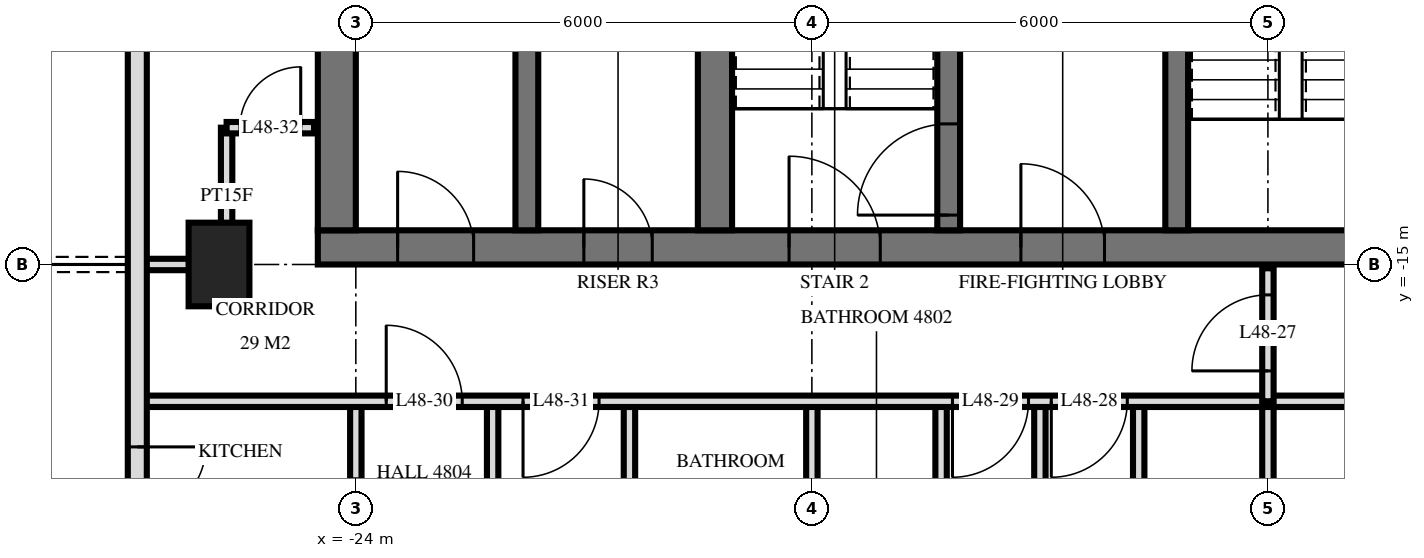
"""IFC4 building model, lengths in metres.
Left out: names, types, materials, properties, quantities, classifications, styles, units other than length and angle.
Written with IfcOpenShell. Run it as: python <this file> out.ifc"""

import sys

from ifc_helpers import new_model, si_unit, direction, frame, frame_2d, origin, origin_2d, place, context, subcontext, project, spatial, rectangle, extrude, element, fill, save


model = new_model("IFC4")
c1 = context("Model", 3, precision=1e-05, world=origin(), true_north=direction((0.0, 1.0)))
c2 = subcontext(c1, "Body", "Model", "MODEL_VIEW")
j1 = project(units=[si_unit("LENGTHUNIT", "METRE"), si_unit("PLANEANGLEUNIT", "RADIAN")], contexts=[c1])
p1 = place(None, origin())
s1 = spatial("IfcSite", under=j1, at=p1, CompositionType="ELEMENT")
p2 = place(p1, origin())
s2 = spatial("IfcBuilding", under=s1, at=p2, CompositionType="ELEMENT")
p3 = place(p2, frame((0.0, 0.0, 187.1)))
s3 = spatial("IfcBuildingStorey", under=s2, at=p3, CompositionType="ELEMENT", Elevation=187.1)
p4 = place(p3, frame((-25.8, -15.0, 0.0), z_axis=(0.0, 0.0, 1.0), x_axis=(0.0, 1.0, 0.0)))
e1 = element("IfcColumn", 1, at=p4, inside=s3, PredefinedType="COLUMN", context=c2, shape_type="SweptSolid", body=[
    extrude(rectangle(XDim=1.1, YDim=0.8, at=origin_2d()), origin(), (0.0, 0.0, 1.0), 3.5),
])
p5 = place(p3, frame((-24.5, -14.775, 0.0), z_axis=(0.0, 0.0, 1.0), x_axis=(1.0, 0.0, 0.0)))
e2 = element("IfcWall", 2, at=p5, inside=s3, PredefinedType="SHEAR", context=c2, shape_type="SweptSolid", body=[
    extrude(rectangle(XDim=14.5, YDim=0.45, at=frame_2d((7.25, 0.0))), origin(), (0.0, 0.0, 1.0), 3.5),
])
p6 = place(p5, frame((6.2, 0.0, 0.0)))
e3 = element("IfcOpeningElement", 3, at=p6, cuts=e2, PredefinedType="OPENING", context=c2, shape_type="SweptSolid", body=[
    extrude(rectangle(XDim=1.2, YDim=2.1, at=frame_2d((0.6, 1.05))), frame((0.0, 0.235, 0.0), z_axis=(0.0, -1.0, 0.0), x_axis=(1.0, 0.0, 0.0)), (0.0, 0.0, 1.0), 0.47),
])
p7 = place(p5, frame((9.25, 0.0, 0.0)))
e4 = element("IfcOpeningElement", 4, at=p7, cuts=e2, PredefinedType="OPENING", context=c2, shape_type="SweptSolid", body=[
    extrude(rectangle(XDim=1.1, YDim=2.1, at=frame_2d((0.55, 1.05))), frame((0.0, 0.235, 0.0), z_axis=(0.0, -1.0, 0.0), x_axis=(1.0, 0.0, 0.0)), (0.0, 0.0, 1.0), 0.47),
])
p8 = place(p5, frame((3.5, 0.0, 0.0)))
e5 = element("IfcOpeningElement", 5, at=p8, cuts=e2, PredefinedType="OPENING", context=c2, shape_type="SweptSolid", body=[
    extrude(rectangle(XDim=0.9, YDim=2.1, at=frame_2d((0.45, 1.05))), frame((0.0, 0.235, 0.0), z_axis=(0.0, -1.0, 0.0), x_axis=(1.0, 0.0, 0.0)), (0.0, 0.0, 1.0), 0.47),
])
p9 = place(p5, frame((1.05, 0.0, 0.0)))
e6 = element("IfcOpeningElement", 6, at=p9, cuts=e2, PredefinedType="OPENING", context=c2, shape_type="SweptSolid", body=[
    extrude(rectangle(XDim=1.0, YDim=2.1, at=frame_2d((0.5, 1.05))), frame((0.0, 0.235, 0.0), z_axis=(0.0, -1.0, 0.0), x_axis=(1.0, 0.0, 0.0)), (0.0, 0.0, 1.0), 0.47),
])
p10 = place(p3, frame((-24.25, -14.55, 0.0), z_axis=(0.0, 0.0, 1.0), x_axis=(0.0, 1.0, 0.0)))
e7 = element("IfcWall", 7, at=p10, inside=s3, PredefinedType="SHEAR", context=c2, shape_type="SweptSolid", body=[
    extrude(rectangle(XDim=14.1, YDim=0.5, at=frame_2d((7.05, 0.0))), origin(), (0.0, 0.0, 1.0), 3.5),
])
p11 = place(p3, frame((-13.2, -14.55, 0.0), z_axis=(0.0, 0.0, 1.0), x_axis=(0.0, 1.0, 0.0)))
e8 = element("IfcWall", 8, at=p11, inside=s3, PredefinedType="SHEAR", context=c2, shape_type="SweptSolid", body=[
    extrude(rectangle(XDim=5.4, YDim=0.3, at=frame_2d((2.7, 0.0))), origin(), (0.0, 0.0, 1.0), 3.5),
])
p12 = place(p11, frame((4.0, 0.0, 0.0)))
e9 = element("IfcOpeningElement", 9, at=p12, cuts=e8, PredefinedType="OPENING", context=c2, shape_type="SweptSolid", body=[
    extrude(rectangle(XDim=1.2, YDim=2.1, at=frame_2d((0.6, 1.05))), frame((0.0, 0.16, 0.0), z_axis=(0.0, -1.0, 0.0), x_axis=(1.0, 0.0, 0.0)), (0.0, 0.0, 1.0), 0.32),
])
p13 = place(p3, frame((-16.2, -14.55, 0.0), z_axis=(0.0, 0.0, 1.0), x_axis=(0.0, 1.0, 0.0)))
e10 = element("IfcWall", 10, at=p13, inside=s3, PredefinedType="SHEAR", context=c2, shape_type="SweptSolid", body=[
    extrude(rectangle(XDim=5.4, YDim=0.3, at=frame_2d((2.7, 0.0))), origin(), (0.0, 0.0, 1.0), 3.5),
])
p14 = place(p13, frame((0.2, 0.0, 0.0)))
e11 = element("IfcOpeningElement", 11, at=p14, cuts=e10, PredefinedType="OPENING", context=c2, shape_type="SweptSolid", body=[
    extrude(rectangle(XDim=1.2, YDim=2.1, at=frame_2d((0.6, 1.05))), frame((0.0, 0.16, 0.0), z_axis=(0.0, -1.0, 0.0), x_axis=(1.0, 0.0, 0.0)), (0.0, 0.0, 1.0), 0.32),
])
p15 = place(p3, frame((-19.275, -14.55, 0.0), z_axis=(0.0, 0.0, 1.0), x_axis=(0.0, 1.0, 0.0)))
e12 = element("IfcWall", 12, at=p15, inside=s3, PredefinedType="SHEAR", context=c2, shape_type="SweptSolid", body=[
    extrude(rectangle(XDim=5.4, YDim=0.45, at=frame_2d((2.7, 0.0))), origin(), (0.0, 0.0, 1.0), 3.5),
])
p16 = place(p3, frame((-21.75, -14.55, 0.0), z_axis=(0.0, 0.0, 1.0), x_axis=(0.0, 1.0, 0.0)))
e13 = element("IfcWall", 13, at=p16, inside=s3, PredefinedType="SHEAR", context=c2, shape_type="SweptSolid", body=[
    extrude(rectangle(XDim=5.4, YDim=0.3, at=frame_2d((2.7, 0.0))), origin(), (0.0, 0.0, 1.0), 3.5),
])
p17 = place(p3, frame((-26.875, -3.325, 0.0), z_axis=(0.0, 0.0, 1.0), x_axis=(0.0, -1.0, 0.0)))
e14 = element("IfcWall", 14, at=p17, inside=s3, PredefinedType="SOLIDWALL", context=c2, shape_type="SweptSolid", body=[
    extrude(rectangle(XDim=21.551, YDim=0.25, at=frame_2d((10.775, 0.0))), origin(), (0.0, 0.0, 1.0), 3.22),
])
p18 = place(p17, frame((7.025, 0.0, 0.0)))
e15 = element("IfcOpeningElement", 15, at=p18, cuts=e14, PredefinedType="OPENING", context=c2, shape_type="SweptSolid", body=[
    extrude(rectangle(XDim=1.8, YDim=2.4, at=frame_2d((0.9, 1.2))), frame((0.0, 0.135, 0.0), z_axis=(0.0, -1.0, 0.0), x_axis=(1.0, 0.0, 0.0)), (0.0, 0.0, 1.0), 0.27),
])
p19 = place(p17, frame((14.075, 0.0, 0.0)))
e16 = element("IfcOpeningElement", 16, at=p19, cuts=e14, PredefinedType="OPENING", context=c2, shape_type="SweptSolid", body=[
    extrude(rectangle(XDim=1.8, YDim=2.4, at=frame_2d((0.9, 1.2))), frame((0.0, 0.135, 0.0), z_axis=(0.0, -1.0, 0.0), x_axis=(1.0, 0.0, 0.0)), (0.0, 0.0, 1.0), 0.27),
])
p20 = place(p17, frame((18.875, 0.0, 0.0)))
e17 = element("IfcOpeningElement", 17, at=p20, cuts=e14, PredefinedType="OPENING", context=c2, shape_type="SweptSolid", body=[
    extrude(rectangle(XDim=1.8, YDim=2.4, at=frame_2d((0.9, 1.2))), frame((0.0, 0.135, 0.0), z_axis=(0.0, -1.0, 0.0), x_axis=(1.0, 0.0, 0.0)), (0.0, 0.0, 1.0), 0.27),
])
p21 = place(p3, frame((-12.0, -16.8, 0.0), z_axis=(0.0, 0.0, 1.0), x_axis=(0.0, 1.0, 0.0)))
e18 = element("IfcWall", 18, at=p21, inside=s3, PredefinedType="PARTITIONING", context=c2, shape_type="SweptSolid", body=[
    extrude(rectangle(XDim=1.75, YDim=0.15, at=frame_2d((0.875, 0.0))), origin(), (0.0, 0.0, 1.0), 3.22),
])
p22 = place(p21, frame((0.4, 0.0, 0.0)))
e19 = element("IfcOpeningElement", 19, at=p22, cuts=e18, PredefinedType="OPENING", context=c2, shape_type="SweptSolid", body=[
    extrude(rectangle(XDim=1.0, YDim=2.1, at=frame_2d((0.5, 1.05))), frame((0.0, 0.085, 0.0), z_axis=(0.0, -1.0, 0.0), x_axis=(1.0, 0.0, 0.0)), (0.0, 0.0, 1.0), 0.17),
])
p23 = place(p3, frame((-12.0, -29.22, 0.0), z_axis=(0.0, 0.0, 1.0), x_axis=(0.0, 1.0, 0.0)))
e20 = element("IfcWall", 20, at=p23, inside=s3, PredefinedType="PARTITIONING", context=c2, shape_type="SweptSolid", body=[
    extrude(rectangle(XDim=12.42, YDim=0.15, at=frame_2d((6.21, 0.0))), origin(), (0.0, 0.0, 1.0), 3.22),
])
p24 = place(p3, frame((-13.7, -19.8, 0.0), z_axis=(0.0, 0.0, 1.0), x_axis=(0.0, 1.0, 0.0)))
e21 = element("IfcWall", 21, at=p24, inside=s3, PredefinedType="PARTITIONING", context=c2, shape_type="SweptSolid", body=[
    extrude(rectangle(XDim=3.0, YDim=0.15, at=frame_2d((1.5, 0.0))), origin(), (0.0, 0.0, 1.0), 3.22),
])
p25 = place(p24, frame((1.1, 0.0, 0.0)))
e22 = element("IfcOpeningElement", 22, at=p25, cuts=e21, PredefinedType="OPENING", context=c2, shape_type="SweptSolid", body=[
    extrude(rectangle(XDim=0.8, YDim=2.1, at=frame_2d((0.4, 1.05))), frame((0.0, 0.085, 0.0), z_axis=(0.0, -1.0, 0.0), x_axis=(1.0, 0.0, 0.0)), (0.0, 0.0, 1.0), 0.17),
])
p26 = place(p3, frame((-15.0, -29.22, 0.0), z_axis=(0.0, 0.0, 1.0), x_axis=(0.0, 1.0, 0.0)))
e23 = element("IfcWall", 23, at=p26, inside=s3, PredefinedType="PARTITIONING", context=c2, shape_type="SweptSolid", body=[
    extrude(rectangle(XDim=12.42, YDim=0.15, at=frame_2d((6.21, 0.0))), origin(), (0.0, 0.0, 1.0), 3.22),
])
p27 = place(p3, frame((-16.3, -19.8, 0.0), z_axis=(0.0, 0.0, 1.0), x_axis=(0.0, 1.0, 0.0)))
e24 = element("IfcWall", 24, at=p27, inside=s3, PredefinedType="PARTITIONING", context=c2, shape_type="SweptSolid", body=[
    extrude(rectangle(XDim=3.0, YDim=0.15, at=frame_2d((1.5, 0.0))), origin(), (0.0, 0.0, 1.0), 3.22),
])
p28 = place(p27, frame((1.1, 0.0, 0.0)))
e25 = element("IfcOpeningElement", 25, at=p28, cuts=e24, PredefinedType="OPENING", context=c2, shape_type="SweptSolid", body=[
    extrude(rectangle(XDim=0.8, YDim=2.1, at=frame_2d((0.4, 1.05))), frame((0.0, 0.085, 0.0), z_axis=(0.0, -1.0, 0.0), x_axis=(1.0, 0.0, 0.0)), (0.0, 0.0, 1.0), 0.17),
])
p29 = place(p3, frame((-18.0, -29.22, 0.0), z_axis=(0.0, 0.0, 1.0), x_axis=(0.0, 1.0, 0.0)))
e26 = element("IfcWall", 26, at=p29, inside=s3, PredefinedType="PARTITIONING", context=c2, shape_type="SweptSolid", body=[
    extrude(rectangle(XDim=12.42, YDim=0.15, at=frame_2d((6.21, 0.0))), origin(), (0.0, 0.0, 1.0), 3.22),
])
for number, where, z_axis, x_axis in (
    (27, (-20.4, -19.8, 0.0), (0.0, 0.0, 1.0), (0.0, 1.0, 0.0)),
    (28, (-22.2, -19.8, 0.0), (0.0, 0.0, 1.0), (0.0, 1.0, 0.0)),
):
    element("IfcWall", number, at=place(p3, frame(where, z_axis=z_axis, x_axis=x_axis)), inside=s3, PredefinedType="PARTITIONING", context=c2, shape_type="SweptSolid", body=[
        extrude(rectangle(XDim=3.0, YDim=0.15, at=frame_2d((1.5, 0.0))), origin(), (0.0, 0.0, 1.0), 3.22),
    ])
p30 = place(p3, frame((-24.0, -19.8, 0.0), z_axis=(0.0, 0.0, 1.0), x_axis=(0.0, 1.0, 0.0)))
e29 = element("IfcWall", 29, at=p30, inside=s3, PredefinedType="PARTITIONING", context=c2, shape_type="SweptSolid", body=[
    extrude(rectangle(XDim=3.0, YDim=0.15, at=frame_2d((1.5, 0.0))), origin(), (0.0, 0.0, 1.0), 3.22),
])
p31 = place(p30, frame((0.98, 0.0, 0.0)))
e30 = element("IfcOpeningElement", 30, at=p31, cuts=e29, PredefinedType="OPENING", context=c2, shape_type="SweptSolid", body=[
    extrude(rectangle(XDim=1.0, YDim=2.1, at=frame_2d((0.5, 1.05))), frame((0.0, 0.085, 0.0), z_axis=(0.0, -1.0, 0.0), x_axis=(1.0, 0.0, 0.0)), (0.0, 0.0, 1.0), 0.17),
])
p32 = place(p3, frame((-25.7, -15.0, 0.0), z_axis=(0.0, 0.0, 1.0), x_axis=(0.0, 1.0, 0.0)))
e31 = element("IfcWall", 31, at=p32, inside=s3, PredefinedType="PARTITIONING", context=c2, shape_type="SweptSolid", body=[
    extrude(rectangle(XDim=1.8, YDim=0.15, at=frame_2d((0.9, 0.0))), origin(), (0.0, 0.0, 1.0), 3.22),
])
p33 = place(p3, frame((-26.82, -16.8, 0.0), z_axis=(0.0, 0.0, 1.0), x_axis=(1.0, 0.0, 0.0)))
e32 = element("IfcWall", 32, at=p33, inside=s3, PredefinedType="PARTITIONING", context=c2, shape_type="SweptSolid", body=[
    extrude(rectangle(XDim=53.64, YDim=0.15, at=frame_2d((26.82, 0.0))), origin(), (0.0, 0.0, 1.0), 3.22),
])
p34 = place(p33, frame((11.97, 0.0, 0.0)))
e33 = element("IfcOpeningElement", 33, at=p34, cuts=e32, PredefinedType="OPENING", context=c2, shape_type="SweptSolid", body=[
    extrude(rectangle(XDim=1.0, YDim=2.1, at=frame_2d((0.5, 1.05))), frame((0.0, 0.085, 0.0), z_axis=(0.0, -1.0, 0.0), x_axis=(1.0, 0.0, 0.0)), (0.0, 0.0, 1.0), 0.17),
])
p35 = place(p33, frame((10.67, 0.0, 0.0)))
e34 = element("IfcOpeningElement", 34, at=p35, cuts=e32, PredefinedType="OPENING", context=c2, shape_type="SweptSolid", body=[
    extrude(rectangle(XDim=1.0, YDim=2.1, at=frame_2d((0.5, 1.05))), frame((0.0, 0.085, 0.0), z_axis=(0.0, -1.0, 0.0), x_axis=(1.0, 0.0, 0.0)), (0.0, 0.0, 1.0), 0.17),
])
p36 = place(p33, frame((3.22, 0.0, 0.0)))
e35 = element("IfcOpeningElement", 35, at=p36, cuts=e32, PredefinedType="OPENING", context=c2, shape_type="SweptSolid", body=[
    extrude(rectangle(XDim=1.0, YDim=2.1, at=frame_2d((0.5, 1.05))), frame((0.0, 0.085, 0.0), z_axis=(0.0, -1.0, 0.0), x_axis=(1.0, 0.0, 0.0)), (0.0, 0.0, 1.0), 0.17),
])
p37 = place(p33, frame((5.02, 0.0, 0.0)))
e36 = element("IfcOpeningElement", 36, at=p37, cuts=e32, PredefinedType="OPENING", context=c2, shape_type="SweptSolid", body=[
    extrude(rectangle(XDim=1.0, YDim=2.1, at=frame_2d((0.5, 1.05))), frame((0.0, 0.085, 0.0), z_axis=(0.0, -1.0, 0.0), x_axis=(1.0, 0.0, 0.0)), (0.0, 0.0, 1.0), 0.17),
])
p38 = place(p33, frame((38.97, 0.0, 0.0)))
e37 = element("IfcOpeningElement", 37, at=p38, cuts=e32, PredefinedType="OPENING", context=c2, shape_type="SweptSolid", body=[
    extrude(rectangle(XDim=1.0, YDim=2.1, at=frame_2d((0.5, 1.05))), frame((0.0, 0.085, 0.0), z_axis=(0.0, -1.0, 0.0), x_axis=(1.0, 0.0, 0.0)), (0.0, 0.0, 1.0), 0.17),
])
p39 = place(p33, frame((48.72, 0.0, 0.0)))
e38 = element("IfcOpeningElement", 38, at=p39, cuts=e32, PredefinedType="OPENING", context=c2, shape_type="SweptSolid", body=[
    extrude(rectangle(XDim=1.0, YDim=2.1, at=frame_2d((0.5, 1.05))), frame((0.0, 0.085, 0.0), z_axis=(0.0, -1.0, 0.0), x_axis=(1.0, 0.0, 0.0)), (0.0, 0.0, 1.0), 0.17),
])
p40 = place(p33, frame((46.92, 0.0, 0.0)))
e39 = element("IfcOpeningElement", 39, at=p40, cuts=e32, PredefinedType="OPENING", context=c2, shape_type="SweptSolid", body=[
    extrude(rectangle(XDim=1.0, YDim=2.1, at=frame_2d((0.5, 1.05))), frame((0.0, 0.085, 0.0), z_axis=(0.0, -1.0, 0.0), x_axis=(1.0, 0.0, 0.0)), (0.0, 0.0, 1.0), 0.17),
])
p41 = place(p33, frame((18.32, 0.0, 0.0)))
e40 = element("IfcOpeningElement", 40, at=p41, cuts=e32, PredefinedType="OPENING", context=c2, shape_type="SweptSolid", body=[
    extrude(rectangle(XDim=1.0, YDim=2.1, at=frame_2d((0.5, 1.05))), frame((0.0, 0.085, 0.0), z_axis=(0.0, -1.0, 0.0), x_axis=(1.0, 0.0, 0.0)), (0.0, 0.0, 1.0), 0.17),
])
p42 = place(p33, frame((26.32, 0.0, 0.0)))
e41 = element("IfcOpeningElement", 41, at=p42, cuts=e32, PredefinedType="OPENING", context=c2, shape_type="SweptSolid", body=[
    extrude(rectangle(XDim=1.0, YDim=2.1, at=frame_2d((0.5, 1.05))), frame((0.0, 0.085, 0.0), z_axis=(0.0, -1.0, 0.0), x_axis=(1.0, 0.0, 0.0)), (0.0, 0.0, 1.0), 0.17),
])
p43 = place(p33, frame((34.32, 0.0, 0.0)))
e42 = element("IfcOpeningElement", 42, at=p43, cuts=e32, PredefinedType="OPENING", context=c2, shape_type="SweptSolid", body=[
    extrude(rectangle(XDim=1.0, YDim=2.1, at=frame_2d((0.5, 1.05))), frame((0.0, 0.085, 0.0), z_axis=(0.0, -1.0, 0.0), x_axis=(1.0, 0.0, 0.0)), (0.0, 0.0, 1.0), 0.17),
])
p44 = place(p3, frame((-26.82, -15.0, 0.0), z_axis=(0.0, 0.0, 1.0), x_axis=(1.0, 0.0, 0.0)))
e43 = element("IfcWall", 43, at=p44, inside=s3, PredefinedType="PARTITIONING", context=c2, shape_type="SweptSolid", body=[
    extrude(rectangle(XDim=1.12, YDim=0.15, at=frame_2d((0.56, 0.0))), origin(), (0.0, 0.0, 1.0), 3.22),
])
p45 = place(p3, frame((-25.7, -13.2, 0.0), z_axis=(0.0, 0.0, 1.0), x_axis=(1.0, 0.0, 0.0)))
e44 = element("IfcWall", 44, at=p45, inside=s3, PredefinedType="PARTITIONING", context=c2, shape_type="SweptSolid", body=[
    extrude(rectangle(XDim=1.15, YDim=0.15, at=frame_2d((0.575, 0.0))), origin(), (0.0, 0.0, 1.0), 3.22),
])
p46 = place(p45, frame((0.175, 0.0, 0.0)))
e45 = element("IfcOpeningElement", 45, at=p46, cuts=e44, PredefinedType="OPENING", context=c2, shape_type="SweptSolid", body=[
    extrude(rectangle(XDim=0.8, YDim=2.1, at=frame_2d((0.4, 1.05))), frame((0.0, 0.085, 0.0), z_axis=(0.0, -1.0, 0.0), x_axis=(1.0, 0.0, 0.0)), (0.0, 0.0, 1.0), 0.17),
])
p47 = place(p19, origin())
e46 = element("IfcDoor", 46, at=p47, inside=s3, OperationType="DOUBLE_DOOR_SINGLE_SWING", PredefinedType="DOOR", context=c2, shape_type="SweptSolid", body=[
    extrude(rectangle(XDim=1.8, YDim=2.4, at=frame_2d((0.9, 1.2))), frame((0.0, 0.025, 0.0), z_axis=(0.0, -1.0, 0.0), x_axis=(1.0, 0.0, 0.0)), (0.0, 0.0, 1.0), 0.05),
])
fill(e16, e46)
p48 = place(p6, origin())
e47 = element("IfcDoor", 47, at=p48, inside=s3, OperationType="SINGLE_SWING_RIGHT", PredefinedType="DOOR", context=c2, shape_type="SweptSolid", body=[
    extrude(rectangle(XDim=1.2, YDim=2.1, at=frame_2d((0.6, 1.05))), frame((0.0, 0.025, 0.0), z_axis=(0.0, -1.0, 0.0), x_axis=(1.0, 0.0, 0.0)), (0.0, 0.0, 1.0), 0.05),
])
fill(e3, e47)
p49 = place(p7, origin())
e48 = element("IfcDoor", 48, at=p49, inside=s3, OperationType="SINGLE_SWING_RIGHT", PredefinedType="DOOR", context=c2, shape_type="SweptSolid", body=[
    extrude(rectangle(XDim=1.1, YDim=2.1, at=frame_2d((0.55, 1.05))), frame((0.0, 0.025, 0.0), z_axis=(0.0, -1.0, 0.0), x_axis=(1.0, 0.0, 0.0)), (0.0, 0.0, 1.0), 0.05),
])
fill(e4, e48)
p50 = place(p8, origin())
e49 = element("IfcDoor", 49, at=p50, inside=s3, OperationType="SINGLE_SWING_RIGHT", PredefinedType="DOOR", context=c2, shape_type="SweptSolid", body=[
    extrude(rectangle(XDim=0.9, YDim=2.1, at=frame_2d((0.45, 1.05))), frame((0.0, 0.025, 0.0), z_axis=(0.0, -1.0, 0.0), x_axis=(1.0, 0.0, 0.0)), (0.0, 0.0, 1.0), 0.05),
])
fill(e5, e49)
p51 = place(p9, origin())
e50 = element("IfcDoor", 50, at=p51, inside=s3, OperationType="SINGLE_SWING_RIGHT", PredefinedType="DOOR", context=c2, shape_type="SweptSolid", body=[
    extrude(rectangle(XDim=1.0, YDim=2.1, at=frame_2d((0.5, 1.05))), frame((0.0, 0.025, 0.0), z_axis=(0.0, -1.0, 0.0), x_axis=(1.0, 0.0, 0.0)), (0.0, 0.0, 1.0), 0.05),
])
fill(e6, e50)
p52 = place(p14, origin())
e51 = element("IfcDoor", 51, at=p52, inside=s3, OperationType="SINGLE_SWING_RIGHT", PredefinedType="DOOR", context=c2, shape_type="SweptSolid", body=[
    extrude(rectangle(XDim=1.2, YDim=2.1, at=frame_2d((0.6, 1.05))), frame((0.0, 0.025, 0.0), z_axis=(0.0, -1.0, 0.0), x_axis=(1.0, 0.0, 0.0)), (0.0, 0.0, 1.0), 0.05),
])
fill(e11, e51)
p53 = place(p22, origin())
e52 = element("IfcDoor", 52, at=p53, inside=s3, OperationType="SINGLE_SWING_RIGHT", PredefinedType="DOOR", context=c2, shape_type="SweptSolid", body=[
    extrude(rectangle(XDim=1.0, YDim=2.1, at=frame_2d((0.5, 1.05))), frame((0.0, 0.025, 0.0), z_axis=(0.0, -1.0, 0.0), x_axis=(1.0, 0.0, 0.0)), (0.0, 0.0, 1.0), 0.05),
])
fill(e19, e52)
p54 = place(p34, frame((0.5, 0.0, 0.0), z_axis=(0.0, 0.0, 1.0), x_axis=(-1.0, 0.0, 0.0)))
e53 = element("IfcDoor", 53, at=p54, inside=s3, OperationType="SINGLE_SWING_LEFT", PredefinedType="DOOR", context=c2, shape_type="SweptSolid", body=[
    extrude(rectangle(XDim=1.0, YDim=2.1, at=frame_2d((0.0, 1.05))), frame((0.0, -0.025, 0.0), z_axis=(0.0, 1.0, 0.0), x_axis=(-1.0, 0.0, 0.0)), (0.0, 0.0, 1.0), 0.05),
])
fill(e33, e53)
p55 = place(p35, frame((0.5, 0.0, 0.0), z_axis=(0.0, 0.0, 1.0), x_axis=(-1.0, 0.0, 0.0)))
e54 = element("IfcDoor", 54, at=p55, inside=s3, OperationType="SINGLE_SWING_LEFT", PredefinedType="DOOR", context=c2, shape_type="SweptSolid", body=[
    extrude(rectangle(XDim=1.0, YDim=2.1, at=frame_2d((0.0, 1.05))), frame((0.0, -0.025, 0.0), z_axis=(0.0, 1.0, 0.0), x_axis=(-1.0, 0.0, 0.0)), (0.0, 0.0, 1.0), 0.05),
])
fill(e34, e54)
p56 = place(p36, origin())
e55 = element("IfcDoor", 55, at=p56, inside=s3, OperationType="SINGLE_SWING_RIGHT", PredefinedType="DOOR", context=c2, shape_type="SweptSolid", body=[
    extrude(rectangle(XDim=1.0, YDim=2.1, at=frame_2d((0.5, 1.05))), frame((0.0, 0.025, 0.0), z_axis=(0.0, -1.0, 0.0), x_axis=(1.0, 0.0, 0.0)), (0.0, 0.0, 1.0), 0.05),
])
fill(e35, e55)
p57 = place(p37, frame((0.5, 0.0, 0.0), z_axis=(0.0, 0.0, 1.0), x_axis=(-1.0, 0.0, 0.0)))
e56 = element("IfcDoor", 56, at=p57, inside=s3, OperationType="SINGLE_SWING_LEFT", PredefinedType="DOOR", context=c2, shape_type="SweptSolid", body=[
    extrude(rectangle(XDim=1.0, YDim=2.1, at=frame_2d((0.0, 1.05))), frame((0.0, -0.025, 0.0), z_axis=(0.0, 1.0, 0.0), x_axis=(-1.0, 0.0, 0.0)), (0.0, 0.0, 1.0), 0.05),
])
fill(e36, e56)
p58 = place(p46, origin())
e57 = element("IfcDoor", 57, at=p58, inside=s3, OperationType="SINGLE_SWING_LEFT", PredefinedType="DOOR", context=c2, shape_type="SweptSolid", body=[
    extrude(rectangle(XDim=0.8, YDim=2.1, at=frame_2d((0.4, 1.05))), frame((0.0, 0.025, 0.0), z_axis=(0.0, -1.0, 0.0), x_axis=(1.0, 0.0, 0.0)), (0.0, 0.0, 1.0), 0.05),
])
fill(e45, e57)
save(model, sys.argv[1])
